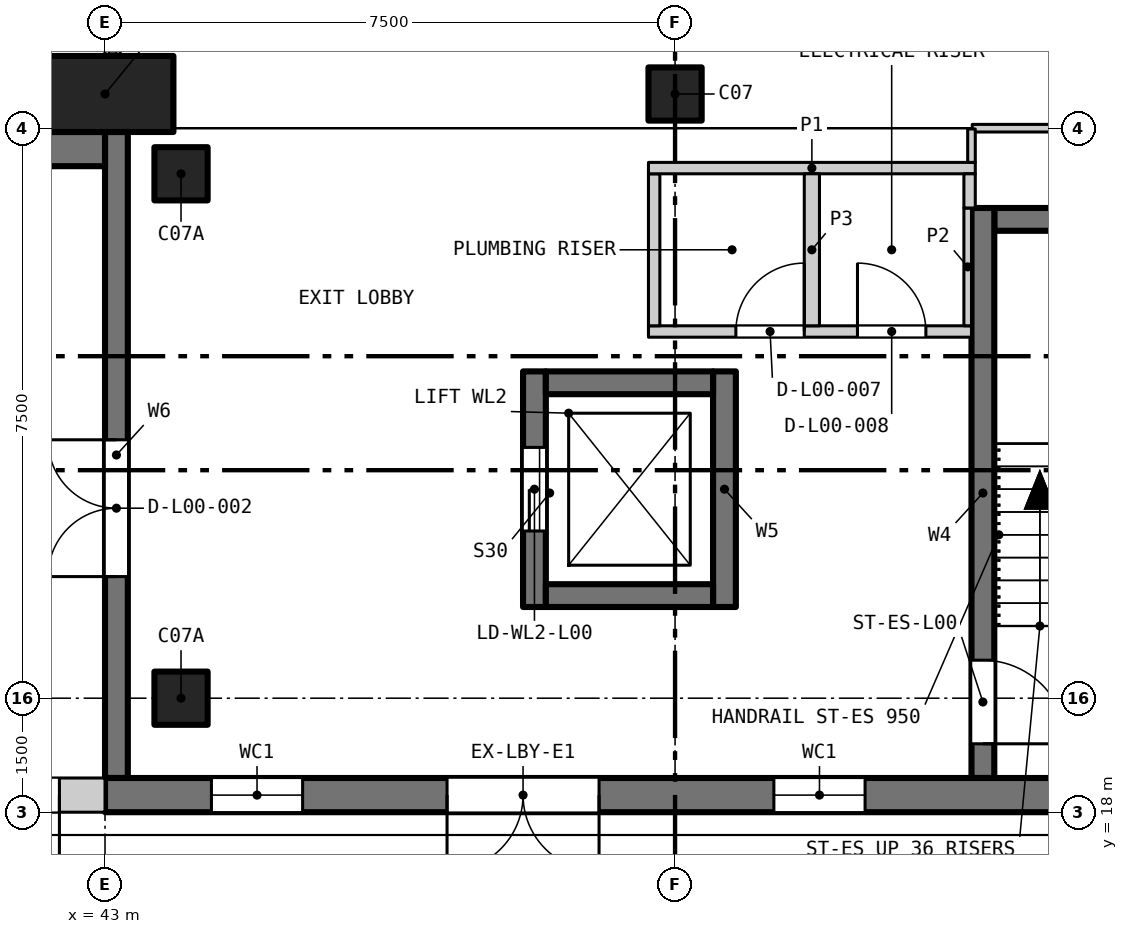
"""IFC4 building model, lengths in metres.
Left out: names, types, materials, properties, quantities, classifications, styles, units other than length and angle.
Written with IfcOpenShell. Run it as: python <this file> out.ifc"""

import sys

from ifc_helpers import new_model, si_unit, direction, frame, frame_2d, origin, origin_2d, place, context, subcontext, project, spatial, rectangle, extrude, element, fill, save


model = new_model("IFC4")
c1 = context("Model", 3, precision=1e-05, world=origin(), true_north=direction((0.0, 1.0)))
c2 = subcontext(c1, "Body", "Model", "MODEL_VIEW")
j1 = project(units=[si_unit("LENGTHUNIT", "METRE"), si_unit("PLANEANGLEUNIT", "RADIAN")], contexts=[c1])
p1 = place(None, origin())
s1 = spatial("IfcSite", under=j1, at=p1, CompositionType="ELEMENT")
p2 = place(p1, origin())
s2 = spatial("IfcBuilding", under=s1, at=p2, CompositionType="ELEMENT")
p3 = place(p2, origin())
s3 = spatial("IfcBuildingStorey", under=s2, at=p3, CompositionType="ELEMENT", Elevation=0.0)
for number, where, z_axis, x_axis in (
    (1, (50.5, 27.45, 0.0), (0.0, 0.0, 1.0), (1.0, 0.0, 0.0)),
    (2, (44.0, 19.5, 0.0), (0.0, 0.0, 1.0), (1.0, 0.0, 0.0)),
    (3, (44.0, 26.4, 0.0), (0.0, 0.0, 1.0), (1.0, 0.0, 0.0)),
):
    element("IfcColumn", number, at=place(p3, frame(where, z_axis=z_axis, x_axis=x_axis)), inside=s3, PredefinedType="COLUMN", context=c2, shape_type="SweptSolid", body=[
        extrude(rectangle(XDim=0.7, YDim=0.7, at=origin_2d()), origin(), (0.0, 0.0, 1.0), 6.0),
    ])
p4 = place(p3, frame((43.15, 18.45, 0.0), z_axis=(0.0, 0.0, 1.0), x_axis=(0.0, 1.0, 0.0)))
e4 = element("IfcWall", 4, at=p4, inside=s3, PredefinedType="SOLIDWALL", context=c2, shape_type="SweptSolid", body=[
    extrude(rectangle(XDim=8.5, YDim=0.3, at=frame_2d((4.25, 0.0))), origin(), (0.0, 0.0, 1.0), 6.0),
])
p5 = place(p4, frame((2.65, 0.0, 0.0)))
e5 = element("IfcOpeningElement", 5, at=p5, cuts=e4, PredefinedType="OPENING", context=c2, shape_type="SweptSolid", body=[
    extrude(rectangle(XDim=1.8, YDim=2.1, at=frame_2d((0.9, 1.05))), frame((0.0, 0.16, 0.0), z_axis=(0.0, -1.0, 0.0), x_axis=(1.0, 0.0, 0.0)), (0.0, 0.0, 1.0), 0.32),
])
p6 = place(p3, frame((54.7, 25.8, 0.0), z_axis=(0.0, 0.0, 1.0), x_axis=(1.0, 0.0, 0.0)))
e6 = element("IfcWall", 6, at=p6, inside=s3, PredefinedType="SHEAR", context=c2, shape_type="SweptSolid", body=[
    extrude(rectangle(XDim=3.0, YDim=0.3, at=frame_2d((1.5, 0.0))), origin(), (0.0, 0.0, 1.0), 6.0),
])
p7 = place(p3, frame((54.55, 18.45, 0.0), z_axis=(0.0, 0.0, 1.0), x_axis=(0.0, 1.0, 0.0)))
e7 = element("IfcWall", 7, at=p7, inside=s3, PredefinedType="SHEAR", context=c2, shape_type="SweptSolid", body=[
    extrude(rectangle(XDim=7.5, YDim=0.3, at=frame_2d((3.75, 0.0))), origin(), (0.0, 0.0, 1.0), 6.0),
])
p8 = place(p7, frame((0.45, 0.0, 0.0)))
e8 = element("IfcOpeningElement", 8, at=p8, cuts=e7, PredefinedType="OPENING", context=c2, shape_type="SweptSolid", body=[
    extrude(rectangle(XDim=1.1, YDim=2.1, at=frame_2d((0.55, 1.05))), frame((0.0, 0.16, 0.0), z_axis=(0.0, -1.0, 0.0), x_axis=(1.0, 0.0, 0.0)), (0.0, 0.0, 1.0), 0.32),
])
p9 = place(p3, frame((48.65, 20.7, 0.0), z_axis=(0.0, 0.0, 1.0), x_axis=(0.0, 1.0, 0.0)))
e9 = element("IfcWall", 9, at=p9, inside=s3, PredefinedType="SHEAR", context=c2, shape_type="SweptSolid", body=[
    extrude(rectangle(XDim=3.1, YDim=0.3, at=frame_2d((1.55, 0.0))), origin(), (0.0, 0.0, 1.0), 6.0),
])
p10 = place(p9, frame((1.0, 0.0, 0.0)))
e10 = element("IfcOpeningElement", 10, at=p10, cuts=e9, PredefinedType="OPENING", context=c2, shape_type="SweptSolid", body=[
    extrude(rectangle(XDim=1.1, YDim=2.1, at=frame_2d((0.55, 1.05))), frame((0.0, 0.16, 0.0), z_axis=(0.0, -1.0, 0.0), x_axis=(1.0, 0.0, 0.0)), (0.0, 0.0, 1.0), 0.32),
])
p11 = place(p3, frame((51.15, 20.7, 0.0), z_axis=(0.0, 0.0, 1.0), x_axis=(0.0, 1.0, 0.0)))
e11 = element("IfcWall", 11, at=p11, inside=s3, PredefinedType="SHEAR", context=c2, shape_type="SweptSolid", body=[
    extrude(rectangle(XDim=3.1, YDim=0.3, at=frame_2d((1.55, 0.0))), origin(), (0.0, 0.0, 1.0), 6.0),
])
for number, where, z_axis, x_axis in (
    (12, (48.8, 20.85, 0.0), (0.0, 0.0, 1.0), (1.0, 0.0, 0.0)),
    (13, (48.8, 23.65, 0.0), (0.0, 0.0, 1.0), (1.0, 0.0, 0.0)),
):
    element("IfcWall", number, at=place(p3, frame(where, z_axis=z_axis, x_axis=x_axis)), inside=s3, PredefinedType="SHEAR", context=c2, shape_type="SweptSolid", body=[
        extrude(rectangle(XDim=2.2, YDim=0.3, at=frame_2d((1.1, 0.0))), origin(), (0.0, 0.0, 1.0), 6.0),
    ])
p12 = place(p3, frame((43.0, 27.45, 0.0), z_axis=(0.0, 0.0, 1.0), x_axis=(1.0, 0.0, 0.0)))
e14 = element("IfcColumn", 14, at=p12, inside=s3, PredefinedType="COLUMN", context=c2, shape_type="SweptSolid", body=[
    extrude(rectangle(XDim=1.8, YDim=1.0, at=origin_2d()), origin(), (0.0, 0.0, 1.0), 6.0),
])
p13 = place(p3, frame((57.55, 18.225, 0.0), z_axis=(0.0, 0.0, 1.0), x_axis=(-1.0, 0.0, 0.0)))
e15 = element("IfcWall", 15, at=p13, inside=s3, PredefinedType="SOLIDWALL", context=c2, shape_type="SweptSolid", body=[
    extrude(rectangle(XDim=14.55, YDim=0.45, at=frame_2d((7.275, 0.0))), origin(), (0.0, 0.0, 1.0), 5.75),
])
p14 = place(p13, frame((4.55, 0.0, 0.9)))
e16 = element("IfcOpeningElement", 16, at=p14, cuts=e15, PredefinedType="OPENING", context=c2, shape_type="SweptSolid", body=[
    extrude(rectangle(XDim=1.2, YDim=1.5, at=frame_2d((0.6, 0.75))), frame((0.0, 0.235, 0.0), z_axis=(0.0, -1.0, 0.0), x_axis=(1.0, 0.0, 0.0)), (0.0, 0.0, 1.0), 0.47),
])
p15 = place(p13, frame((11.95, 0.0, 0.9)))
e17 = element("IfcOpeningElement", 17, at=p15, cuts=e15, PredefinedType="OPENING", context=c2, shape_type="SweptSolid", body=[
    extrude(rectangle(XDim=1.2, YDim=1.5, at=frame_2d((0.6, 0.75))), frame((0.0, 0.235, 0.0), z_axis=(0.0, -1.0, 0.0), x_axis=(1.0, 0.0, 0.0)), (0.0, 0.0, 1.0), 0.47),
])
p16 = place(p13, frame((0.75, 0.0, 0.0)))
e18 = element("IfcOpeningElement", 18, at=p16, cuts=e15, PredefinedType="OPENING", context=c2, shape_type="SweptSolid", body=[
    extrude(rectangle(XDim=1.2, YDim=2.4, at=frame_2d((0.6, 1.2))), frame((0.0, 0.235, 0.0), z_axis=(0.0, -1.0, 0.0), x_axis=(1.0, 0.0, 0.0)), (0.0, 0.0, 1.0), 0.47),
])
p17 = place(p13, frame((8.05, 0.0, 0.0)))
e19 = element("IfcOpeningElement", 19, at=p17, cuts=e15, PredefinedType="OPENING", context=c2, shape_type="SweptSolid", body=[
    extrude(rectangle(XDim=2.0, YDim=2.4, at=frame_2d((1.0, 1.2))), frame((0.0, 0.235, 0.0), z_axis=(0.0, -1.0, 0.0), x_axis=(1.0, 0.0, 0.0)), (0.0, 0.0, 1.0), 0.47),
])
p18 = place(p3, frame((43.0, 26.725, 0.0), z_axis=(0.0, 0.0, 1.0), x_axis=(-1.0, 0.0, 0.0)))
e20 = element("IfcWall", 20, at=p18, inside=s3, PredefinedType="SOLIDWALL", context=c2, shape_type="SweptSolid", body=[
    extrude(rectangle(XDim=28.0, YDim=0.45, at=frame_2d((14.0, 0.0))), origin(), (0.0, 0.0, 1.0), 5.7),
])
p19 = place(p18, frame((18.3, 0.0, 0.0)))
e21 = element("IfcOpeningElement", 21, at=p19, cuts=e20, PredefinedType="OPENING", context=c2, shape_type="SweptSolid", body=[
    extrude(rectangle(XDim=2.4, YDim=2.4, at=frame_2d((1.2, 1.2))), frame((0.0, 0.235, 0.0), z_axis=(0.0, -1.0, 0.0), x_axis=(1.0, 0.0, 0.0)), (0.0, 0.0, 1.0), 0.47),
])
p20 = place(p18, frame((6.3, 0.0, 0.0)))
e22 = element("IfcOpeningElement", 22, at=p20, cuts=e20, PredefinedType="OPENING", context=c2, shape_type="SweptSolid", body=[
    extrude(rectangle(XDim=2.4, YDim=2.4, at=frame_2d((1.2, 1.2))), frame((0.0, 0.235, 0.0), z_axis=(0.0, -1.0, 0.0), x_axis=(1.0, 0.0, 0.0)), (0.0, 0.0, 1.0), 0.47),
])
p21 = place(p3, frame((43.0, 18.225, 0.0), z_axis=(0.0, 0.0, 1.0), x_axis=(-1.0, 0.0, 0.0)))
e23 = element("IfcWall", 23, at=p21, inside=s3, PredefinedType="SOLIDWALL", context=c2, shape_type="SweptSolid", body=[
    extrude(rectangle(XDim=28.0, YDim=0.45, at=frame_2d((14.0, 0.0))), origin(), (0.0, 0.0, 1.0), 5.7),
])
p22 = place(p21, frame((21.5, 0.0, 0.0)))
e24 = element("IfcOpeningElement", 24, at=p22, cuts=e23, PredefinedType="OPENING", context=c2, shape_type="SweptSolid", body=[
    extrude(rectangle(XDim=3.0, YDim=4.2, at=frame_2d((1.5, 2.1))), frame((0.0, 0.235, 0.0), z_axis=(0.0, -1.0, 0.0), x_axis=(1.0, 0.0, 0.0)), (0.0, 0.0, 1.0), 0.47),
])
p23 = place(p21, frame((15.5, 0.0, 0.0)))
e25 = element("IfcOpeningElement", 25, at=p23, cuts=e23, PredefinedType="OPENING", context=c2, shape_type="SweptSolid", body=[
    extrude(rectangle(XDim=3.0, YDim=4.2, at=frame_2d((1.5, 2.1))), frame((0.0, 0.235, 0.0), z_axis=(0.0, -1.0, 0.0), x_axis=(1.0, 0.0, 0.0)), (0.0, 0.0, 1.0), 0.47),
])
p24 = place(p21, frame((9.5, 0.0, 0.0)))
e26 = element("IfcOpeningElement", 26, at=p24, cuts=e23, PredefinedType="OPENING", context=c2, shape_type="SweptSolid", body=[
    extrude(rectangle(XDim=3.0, YDim=4.2, at=frame_2d((1.5, 2.1))), frame((0.0, 0.235, 0.0), z_axis=(0.0, -1.0, 0.0), x_axis=(1.0, 0.0, 0.0)), (0.0, 0.0, 1.0), 0.47),
])
p25 = place(p21, frame((3.5, 0.0, 0.0)))
e27 = element("IfcOpeningElement", 27, at=p25, cuts=e23, PredefinedType="OPENING", context=c2, shape_type="SweptSolid", body=[
    extrude(rectangle(XDim=3.0, YDim=4.2, at=frame_2d((1.5, 2.1))), frame((0.0, 0.235, 0.0), z_axis=(0.0, -1.0, 0.0), x_axis=(1.0, 0.0, 0.0)), (0.0, 0.0, 1.0), 0.47),
])
p26 = place(p21, frame((25.6, 0.0, 0.0)))
e28 = element("IfcOpeningElement", 28, at=p26, cuts=e23, PredefinedType="OPENING", context=c2, shape_type="SweptSolid", body=[
    extrude(rectangle(XDim=1.8, YDim=2.4, at=frame_2d((0.9, 1.2))), frame((0.0, 0.235, 0.0), z_axis=(0.0, -1.0, 0.0), x_axis=(1.0, 0.0, 0.0)), (0.0, 0.0, 1.0), 0.47),
])
p27 = place(p21, frame((0.6, 0.0, 0.0)))
e29 = element("IfcOpeningElement", 29, at=p27, cuts=e23, PredefinedType="OPENING", context=c2, shape_type="SweptSolid", body=[
    extrude(rectangle(XDim=1.8, YDim=2.4, at=frame_2d((0.9, 1.2))), frame((0.0, 0.235, 0.0), z_axis=(0.0, -1.0, 0.0), x_axis=(1.0, 0.0, 0.0)), (0.0, 0.0, 1.0), 0.47),
])
p28 = place(p3, frame((50.15, 24.325, 0.0), z_axis=(0.0, 0.0, 1.0), x_axis=(1.0, 0.0, 0.0)))
e30 = element("IfcWall", 30, at=p28, inside=s3, PredefinedType="PARTITIONING", context=c2, shape_type="SweptSolid", body=[
    extrude(rectangle(XDim=4.25, YDim=0.15, at=frame_2d((2.125, 0.0))), origin(), (0.0, 0.0, 1.0), 5.75),
])
p29 = place(p28, frame((1.15, 0.0, 0.0)))
e31 = element("IfcOpeningElement", 31, at=p29, cuts=e30, PredefinedType="OPENING", context=c2, shape_type="SweptSolid", body=[
    extrude(rectangle(XDim=0.9, YDim=2.1, at=frame_2d((0.45, 1.05))), frame((0.0, 0.085, 0.0), z_axis=(0.0, -1.0, 0.0), x_axis=(1.0, 0.0, 0.0)), (0.0, 0.0, 1.0), 0.17),
])
p30 = place(p28, frame((2.75, 0.0, 0.0)))
e32 = element("IfcOpeningElement", 32, at=p30, cuts=e30, PredefinedType="OPENING", context=c2, shape_type="SweptSolid", body=[
    extrude(rectangle(XDim=0.9, YDim=2.1, at=frame_2d((0.45, 1.05))), frame((0.0, 0.085, 0.0), z_axis=(0.0, -1.0, 0.0), x_axis=(1.0, 0.0, 0.0)), (0.0, 0.0, 1.0), 0.17),
])
p31 = place(p3, frame((50.225, 24.4, 0.0), z_axis=(0.0, 0.0, 1.0), x_axis=(0.0, 1.0, 0.0)))
e33 = element("IfcWall", 33, at=p31, inside=s3, PredefinedType="PARTITIONING", context=c2, shape_type="SweptSolid", body=[
    extrude(rectangle(XDim=2.0, YDim=0.15, at=frame_2d((1.0, 0.0))), origin(), (0.0, 0.0, 1.0), 5.75),
])
p32 = place(p3, frame((50.15, 26.475, 0.0), z_axis=(0.0, 0.0, 1.0), x_axis=(1.0, 0.0, 0.0)))
e34 = element("IfcWall", 34, at=p32, inside=s3, PredefinedType="PARTITIONING", context=c2, shape_type="SweptSolid", body=[
    extrude(rectangle(XDim=4.3, YDim=0.15, at=frame_2d((2.15, 0.0))), origin(), (0.0, 0.0, 1.0), 4.35),
])
p33 = place(p3, frame((52.3, 24.4, 0.0), z_axis=(0.0, 0.0, 1.0), x_axis=(0.0, 1.0, 0.0)))
e35 = element("IfcWall", 35, at=p33, inside=s3, PredefinedType="PARTITIONING", context=c2, shape_type="SweptSolid", body=[
    extrude(rectangle(XDim=2.0, YDim=0.2, at=frame_2d((1.0, 0.0))), origin(), (0.0, 0.0, 1.0), 5.75),
])
p34 = place(p3, frame((54.35, 24.4, 0.0), z_axis=(0.0, 0.0, 1.0), x_axis=(0.0, 1.0, 0.0)))
e36 = element("IfcWall", 36, at=p34, inside=s3, PredefinedType="PARTITIONING", context=c2, shape_type="SweptSolid", body=[
    extrude(rectangle(XDim=1.55, YDim=0.1, at=frame_2d((0.775, 0.0))), origin(), (0.0, 0.0, 1.0), 5.75),
])
p35 = place(p3, frame((54.375, 25.95, 0.0), z_axis=(0.0, 0.0, 1.0), x_axis=(0.0, 1.0, 0.0)))
e37 = element("IfcWall", 37, at=p35, inside=s3, PredefinedType="PARTITIONING", context=c2, shape_type="SweptSolid", body=[
    extrude(rectangle(XDim=0.45, YDim=0.15, at=frame_2d((0.225, 0.0))), origin(), (0.0, 0.0, 1.0), 5.75),
])
p36 = place(p3, frame((54.41, 27.0, 0.0), z_axis=(0.0, 0.0, 1.0), x_axis=(1.0, 0.0, 0.0)))
e38 = element("IfcWall", 38, at=p36, inside=s3, PredefinedType="PARTITIONING", context=c2, shape_type="SweptSolid", body=[
    extrude(rectangle(XDim=3.14, YDim=0.1, at=frame_2d((1.57, 0.0))), origin(), (0.0, 0.0, 1.0), 5.8),
])
p37 = place(p3, frame((54.4, 26.55, 0.0), z_axis=(0.0, 0.0, 1.0), x_axis=(0.0, 1.0, 0.0)))
e39 = element("IfcWall", 39, at=p37, inside=s3, PredefinedType="PARTITIONING", context=c2, shape_type="SweptSolid", body=[
    extrude(rectangle(XDim=0.44, YDim=0.1, at=frame_2d((0.22, 0.0))), origin(), (0.0, 0.0, 1.0), 5.75),
])
p38 = place(p14, origin())
e40 = element("IfcWindow", 40, at=p38, inside=s3, PartitioningType="SINGLE_PANEL", PredefinedType="WINDOW", context=c2, shape_type="SweptSolid", body=[
    extrude(rectangle(XDim=1.2, YDim=1.5, at=frame_2d((0.6, 0.75))), frame((0.0, -0.075, 0.0), z_axis=(0.0, -1.0, 0.0), x_axis=(1.0, 0.0, 0.0)), (0.0, 0.0, 1.0), 0.06),
])
fill(e16, e40)
p39 = place(p15, origin())
e41 = element("IfcWindow", 41, at=p39, inside=s3, PartitioningType="SINGLE_PANEL", PredefinedType="WINDOW", context=c2, shape_type="SweptSolid", body=[
    extrude(rectangle(XDim=1.2, YDim=1.5, at=frame_2d((0.6, 0.75))), frame((0.0, -0.075, 0.0), z_axis=(0.0, -1.0, 0.0), x_axis=(1.0, 0.0, 0.0)), (0.0, 0.0, 1.0), 0.06),
])
fill(e17, e41)
p40 = place(p27, origin())
e42 = element("IfcDoor", 42, at=p40, inside=s3, OperationType="DOUBLE_DOOR_DOUBLE_SWING", PredefinedType="DOOR", context=c2, shape_type="SweptSolid", body=[
    extrude(rectangle(XDim=1.8, YDim=2.4, at=frame_2d((0.9, 1.2))), frame((0.0, 0.025, 0.0), z_axis=(0.0, -1.0, 0.0), x_axis=(1.0, 0.0, 0.0)), (0.0, 0.0, 1.0), 0.05),
])
fill(e29, e42)
p41 = place(p17, origin())
e43 = element("IfcDoor", 43, at=p41, inside=s3, OperationType="DOUBLE_DOOR_DOUBLE_SWING", PredefinedType="DOOR", context=c2, shape_type="SweptSolid", body=[
    extrude(rectangle(XDim=2.0, YDim=2.4, at=frame_2d((1.0, 1.2))), frame((0.0, 0.025, 0.0), z_axis=(0.0, -1.0, 0.0), x_axis=(1.0, 0.0, 0.0)), (0.0, 0.0, 1.0), 0.05),
])
fill(e19, e43)
p42 = place(p5, origin())
e44 = element("IfcDoor", 44, at=p42, inside=s3, OperationType="DOUBLE_DOOR_SINGLE_SWING", PredefinedType="DOOR", context=c2, shape_type="SweptSolid", body=[
    extrude(rectangle(XDim=1.8, YDim=2.1, at=frame_2d((0.9, 1.05))), frame((0.0, 0.025, 0.0), z_axis=(0.0, -1.0, 0.0), x_axis=(1.0, 0.0, 0.0)), (0.0, 0.0, 1.0), 0.05),
])
fill(e5, e44)
p43 = place(p29, origin())
e45 = element("IfcDoor", 45, at=p43, inside=s3, OperationType="SINGLE_SWING_RIGHT", PredefinedType="DOOR", context=c2, shape_type="SweptSolid", body=[
    extrude(rectangle(XDim=0.9, YDim=2.1, at=frame_2d((0.45, 1.05))), frame((0.0, 0.025, 0.0), z_axis=(0.0, -1.0, 0.0), x_axis=(1.0, 0.0, 0.0)), (0.0, 0.0, 1.0), 0.05),
])
fill(e31, e45)
p44 = place(p30, origin())
e46 = element("IfcDoor", 46, at=p44, inside=s3, OperationType="SINGLE_SWING_LEFT", PredefinedType="DOOR", context=c2, shape_type="SweptSolid", body=[
    extrude(rectangle(XDim=0.9, YDim=2.1, at=frame_2d((0.45, 1.05))), frame((0.0, 0.025, 0.0), z_axis=(0.0, -1.0, 0.0), x_axis=(1.0, 0.0, 0.0)), (0.0, 0.0, 1.0), 0.05),
])
fill(e32, e46)
p45 = place(p8, frame((1.1, 0.0, 0.0), z_axis=(0.0, 0.0, 1.0), x_axis=(-1.0, 0.0, 0.0)))
e47 = element("IfcDoor", 47, at=p45, inside=s3, OperationType="SINGLE_SWING_RIGHT", PredefinedType="DOOR", context=c2, shape_type="SweptSolid", body=[
    extrude(rectangle(XDim=1.1, YDim=2.1, at=frame_2d((0.55, 1.05))), frame((0.0, 0.025, 0.0), z_axis=(0.0, -1.0, 0.0), x_axis=(1.0, 0.0, 0.0)), (0.0, 0.0, 1.0), 0.05),
])
fill(e8, e47)
p46 = place(p10, origin())
e48 = element("IfcDoor", 48, at=p46, inside=s3, OperationType="SLIDING_TO_LEFT", PredefinedType="DOOR", context=c2, shape_type="SweptSolid", body=[
    extrude(rectangle(XDim=1.1, YDim=2.1, at=frame_2d((0.55, 1.05))), frame((0.0, 0.025, 0.0), z_axis=(0.0, -1.0, 0.0), x_axis=(1.0, 0.0, 0.0)), (0.0, 0.0, 1.0), 0.05),
])
fill(e10, e48)
save(model, sys.argv[1])
